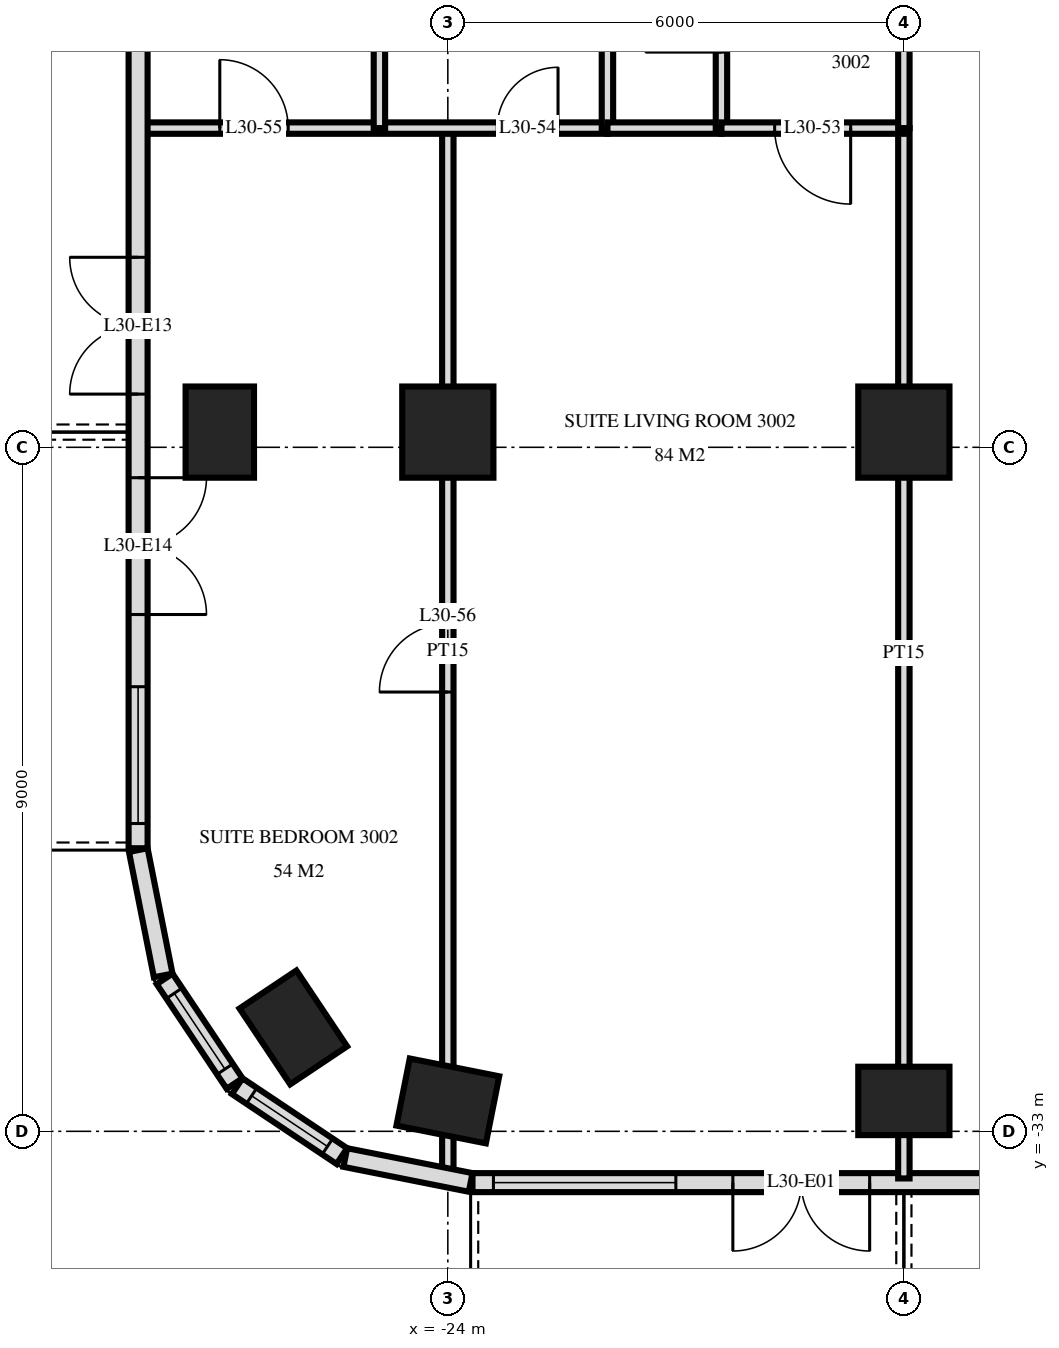
"""IFC4 building model, lengths in metres.
Left out: names, types, materials, properties, quantities, classifications, styles, units other than length and angle.
Written with IfcOpenShell. Run it as: python <this file> out.ifc"""

import sys

from ifc_helpers import new_model, si_unit, direction, frame, frame_2d, origin, origin_2d, place, context, subcontext, project, spatial, rectangle, extrude, element, fill, save


model = new_model("IFC4")
c1 = context("Model", 3, precision=1e-05, world=origin(), true_north=direction((0.0, 1.0)))
c2 = subcontext(c1, "Body", "Model", "MODEL_VIEW")
j1 = project(units=[si_unit("LENGTHUNIT", "METRE"), si_unit("PLANEANGLEUNIT", "RADIAN")], contexts=[c1])
p1 = place(None, origin())
s1 = spatial("IfcSite", under=j1, at=p1, CompositionType="ELEMENT")
p2 = place(p1, origin())
s2 = spatial("IfcBuilding", under=s1, at=p2, CompositionType="ELEMENT")
p3 = place(p2, frame((0.0, 0.0, 120.0)))
s3 = spatial("IfcBuildingStorey", under=s2, at=p3, CompositionType="ELEMENT", Elevation=120.0)
for number, where, z_axis, x_axis in (
    (1, (-27.0, -23.8, 0.0), (0.0, 0.0, 1.0), (0.0, 1.0, 0.0)),
    (2, (-26.033, -31.633, 0.0), (0.0, 0.0, 1.0), (-0.556, 0.831, 0.0)),
    (3, (-24.0, -32.6, 0.0), (0.0, 0.0, 1.0), (-0.981, 0.195, 0.0)),
):
    element("IfcColumn", number, at=place(p3, frame(where, z_axis=z_axis, x_axis=x_axis)), inside=s3, PredefinedType="COLUMN", context=c2, shape_type="SweptSolid", body=[
        extrude(rectangle(XDim=1.2, YDim=0.9, at=origin_2d()), origin(), (0.0, 0.0, 1.0), 3.6),
    ])
p4 = place(p3, frame((-24.0, -23.8, 0.0), z_axis=(0.0, 0.0, 1.0), x_axis=(1.0, 0.0, 0.0)))
e4 = element("IfcColumn", 4, at=p4, inside=s3, PredefinedType="COLUMN", context=c2, shape_type="SweptSolid", body=[
    extrude(rectangle(XDim=1.2, YDim=1.2, at=origin_2d()), origin(), (0.0, 0.0, 1.0), 3.6),
])
p5 = place(p3, frame((-18.0, -32.6, 0.0), z_axis=(0.0, 0.0, 1.0), x_axis=(1.0, 0.0, 0.0)))
e5 = element("IfcColumn", 5, at=p5, inside=s3, PredefinedType="COLUMN", context=c2, shape_type="SweptSolid", body=[
    extrude(rectangle(XDim=1.2, YDim=0.9, at=origin_2d()), origin(), (0.0, 0.0, 1.0), 3.6),
])
p6 = place(p3, frame((-18.0, -23.8, 0.0), z_axis=(0.0, 0.0, 1.0), x_axis=(1.0, 0.0, 0.0)))
e6 = element("IfcColumn", 6, at=p6, inside=s3, PredefinedType="COLUMN", context=c2, shape_type="SweptSolid", body=[
    extrude(rectangle(XDim=1.2, YDim=1.2, at=origin_2d()), origin(), (0.0, 0.0, 1.0), 3.6),
])
p7 = place(p3, frame((-28.075, -3.325, 0.0), z_axis=(0.0, 0.0, 1.0), x_axis=(0.0, -1.0, 0.0)))
e7 = element("IfcWall", 7, at=p7, inside=s3, PredefinedType="SOLIDWALL", context=c2, shape_type="SweptSolid", body=[
    extrude(rectangle(XDim=25.951, YDim=0.25, at=frame_2d((12.975, 0.0))), origin(), (0.0, 0.0, 1.0), 3.32),
])
p8 = place(p7, frame((7.025, 0.0, 0.0)))
e8 = element("IfcOpeningElement", 8, at=p8, cuts=e7, PredefinedType="OPENING", context=c2, shape_type="SweptSolid", body=[
    extrude(rectangle(XDim=1.8, YDim=2.4, at=frame_2d((0.9, 1.2))), frame((0.0, 0.135, 0.0), z_axis=(0.0, -1.0, 0.0), x_axis=(1.0, 0.0, 0.0)), (0.0, 0.0, 1.0), 0.27),
])
p9 = place(p7, frame((18.175, 0.0, 0.0)))
e9 = element("IfcOpeningElement", 9, at=p9, cuts=e7, PredefinedType="OPENING", context=c2, shape_type="SweptSolid", body=[
    extrude(rectangle(XDim=1.8, YDim=2.4, at=frame_2d((0.9, 1.2))), frame((0.0, 0.135, 0.0), z_axis=(0.0, -1.0, 0.0), x_axis=(1.0, 0.0, 0.0)), (0.0, 0.0, 1.0), 0.27),
])
p10 = place(p7, frame((21.075, 0.0, 0.0)))
e10 = element("IfcOpeningElement", 10, at=p10, cuts=e7, PredefinedType="OPENING", context=c2, shape_type="SweptSolid", body=[
    extrude(rectangle(XDim=1.8, YDim=2.4, at=frame_2d((0.9, 1.2))), frame((0.0, 0.135, 0.0), z_axis=(0.0, -1.0, 0.0), x_axis=(1.0, 0.0, 0.0)), (0.0, 0.0, 1.0), 0.27),
])
p11 = place(p7, frame((23.825, 0.0, 0.3)))
e11 = element("IfcOpeningElement", 11, at=p11, cuts=e7, PredefinedType="OPENING", context=c2, shape_type="SweptSolid", body=[
    extrude(rectangle(XDim=1.8, YDim=2.1, at=frame_2d((0.9, 1.05))), frame((0.0, 0.135, 0.0), z_axis=(0.0, -1.0, 0.0), x_axis=(1.0, 0.0, 0.0)), (0.0, 0.0, 1.0), 0.27),
])
p12 = place(p3, frame((-28.073, -29.3, 0.0), z_axis=(0.0, 0.0, 1.0), x_axis=(0.194999110559, -0.980803419081, 0.0)))
e12 = element("IfcWall", 12, at=p12, inside=s3, PredefinedType="SOLIDWALL", context=c2, shape_type="SweptSolid", body=[
    extrude(rectangle(XDim=1.681, YDim=0.25, at=frame_2d((0.841, 0.0))), origin(), (0.0, 0.0, 1.0), 3.32),
])
p13 = place(p3, frame((-27.726, -30.994, 0.0), z_axis=(0.0, 0.0, 1.0), x_axis=(0.55555029066, -0.831482937015, 0.0)))
e13 = element("IfcWall", 13, at=p13, inside=s3, PredefinedType="SOLIDWALL", context=c2, shape_type="SweptSolid", body=[
    extrude(rectangle(XDim=1.656, YDim=0.25, at=frame_2d((0.828, 0.0))), origin(), (0.0, 0.0, 1.0), 3.32),
])
p14 = place(p13, frame((0.228, 0.0, 0.9)))
e14 = element("IfcOpeningElement", 14, at=p14, cuts=e13, PredefinedType="OPENING", context=c2, shape_type="SweptSolid", body=[
    extrude(rectangle(XDim=1.2, YDim=1.5, at=frame_2d((0.6, 0.75))), frame((0.0, 0.135, 0.0), z_axis=(0.0, -1.0, 0.0), x_axis=(1.0, 0.0, 0.0)), (0.0, 0.0, 1.0), 0.27),
])
p15 = place(p3, frame((-26.771, -32.406, 0.0), z_axis=(0.0, 0.0, 1.0), x_axis=(0.831482937015, -0.55555029066, 0.0)))
e15 = element("IfcWall", 15, at=p15, inside=s3, PredefinedType="SOLIDWALL", context=c2, shape_type="SweptSolid", body=[
    extrude(rectangle(XDim=1.656, YDim=0.25, at=frame_2d((0.828, 0.0))), origin(), (0.0, 0.0, 1.0), 3.32),
])
p16 = place(p15, frame((0.228, 0.0, 0.9)))
e16 = element("IfcOpeningElement", 16, at=p16, cuts=e15, PredefinedType="OPENING", context=c2, shape_type="SweptSolid", body=[
    extrude(rectangle(XDim=1.2, YDim=1.5, at=frame_2d((0.6, 0.75))), frame((0.0, 0.135, 0.0), z_axis=(0.0, -1.0, 0.0), x_axis=(1.0, 0.0, 0.0)), (0.0, 0.0, 1.0), 0.27),
])
p17 = place(p3, frame((-25.349, -33.344, 0.0), z_axis=(0.0, 0.0, 1.0), x_axis=(0.980775640221, -0.19513878023, 0.0)))
e17 = element("IfcWall", 17, at=p17, inside=s3, PredefinedType="SOLIDWALL", context=c2, shape_type="SweptSolid", body=[
    extrude(rectangle(XDim=1.681, YDim=0.25, at=frame_2d((0.841, 0.0))), origin(), (0.0, 0.0, 1.0), 3.32),
])
p18 = place(p3, frame((-23.675, -33.675, 0.0), z_axis=(0.0, 0.0, 1.0), x_axis=(1.0, 0.0, 0.0)))
e18 = element("IfcWall", 18, at=p18, inside=s3, PredefinedType="SOLIDWALL", context=c2, shape_type="SweptSolid", body=[
    extrude(rectangle(XDim=47.351, YDim=0.25, at=frame_2d((23.675, 0.0))), origin(), (0.0, 0.0, 1.0), 3.32),
])
p19 = place(p18, frame((0.275, 0.0, 0.3)))
e19 = element("IfcOpeningElement", 19, at=p19, cuts=e18, PredefinedType="OPENING", context=c2, shape_type="SweptSolid", body=[
    extrude(rectangle(XDim=2.4, YDim=2.1, at=frame_2d((1.2, 1.05))), frame((0.0, 0.135, 0.0), z_axis=(0.0, -1.0, 0.0), x_axis=(1.0, 0.0, 0.0)), (0.0, 0.0, 1.0), 0.27),
])
p20 = place(p18, frame((3.425, 0.0, 0.0)))
e20 = element("IfcOpeningElement", 20, at=p20, cuts=e18, PredefinedType="OPENING", context=c2, shape_type="SweptSolid", body=[
    extrude(rectangle(XDim=1.8, YDim=2.4, at=frame_2d((0.9, 1.2))), frame((0.0, 0.135, 0.0), z_axis=(0.0, -1.0, 0.0), x_axis=(1.0, 0.0, 0.0)), (0.0, 0.0, 1.0), 0.27),
])
p21 = place(p18, frame((7.775, 0.0, 0.0)))
e21 = element("IfcOpeningElement", 21, at=p21, cuts=e18, PredefinedType="OPENING", context=c2, shape_type="SweptSolid", body=[
    extrude(rectangle(XDim=1.8, YDim=2.4, at=frame_2d((0.9, 1.2))), frame((0.0, 0.135, 0.0), z_axis=(0.0, -1.0, 0.0), x_axis=(1.0, 0.0, 0.0)), (0.0, 0.0, 1.0), 0.27),
])
p22 = place(p18, frame((12.275, 0.0, 0.0)))
e22 = element("IfcOpeningElement", 22, at=p22, cuts=e18, PredefinedType="OPENING", context=c2, shape_type="SweptSolid", body=[
    extrude(rectangle(XDim=1.8, YDim=2.4, at=frame_2d((0.9, 1.2))), frame((0.0, 0.135, 0.0), z_axis=(0.0, -1.0, 0.0), x_axis=(1.0, 0.0, 0.0)), (0.0, 0.0, 1.0), 0.27),
])
p23 = place(p18, frame((14.975, 0.0, 0.3)))
e23 = element("IfcOpeningElement", 23, at=p23, cuts=e18, PredefinedType="OPENING", context=c2, shape_type="SweptSolid", body=[
    extrude(rectangle(XDim=2.4, YDim=2.1, at=frame_2d((1.2, 1.05))), frame((0.0, 0.135, 0.0), z_axis=(0.0, -1.0, 0.0), x_axis=(1.0, 0.0, 0.0)), (0.0, 0.0, 1.0), 0.27),
])
p24 = place(p18, frame((17.975, 0.0, 0.3)))
e24 = element("IfcOpeningElement", 24, at=p24, cuts=e18, PredefinedType="OPENING", context=c2, shape_type="SweptSolid", body=[
    extrude(rectangle(XDim=2.4, YDim=2.1, at=frame_2d((1.2, 1.05))), frame((0.0, 0.135, 0.0), z_axis=(0.0, -1.0, 0.0), x_axis=(1.0, 0.0, 0.0)), (0.0, 0.0, 1.0), 0.27),
])
p25 = place(p18, frame((21.275, 0.0, 0.0)))
e25 = element("IfcOpeningElement", 25, at=p25, cuts=e18, PredefinedType="OPENING", context=c2, shape_type="SweptSolid", body=[
    extrude(rectangle(XDim=1.8, YDim=2.4, at=frame_2d((0.9, 1.2))), frame((0.0, 0.135, 0.0), z_axis=(0.0, -1.0, 0.0), x_axis=(1.0, 0.0, 0.0)), (0.0, 0.0, 1.0), 0.27),
])
p26 = place(p18, frame((24.275, 0.0, 0.0)))
e26 = element("IfcOpeningElement", 26, at=p26, cuts=e18, PredefinedType="OPENING", context=c2, shape_type="SweptSolid", body=[
    extrude(rectangle(XDim=1.8, YDim=2.4, at=frame_2d((0.9, 1.2))), frame((0.0, 0.135, 0.0), z_axis=(0.0, -1.0, 0.0), x_axis=(1.0, 0.0, 0.0)), (0.0, 0.0, 1.0), 0.27),
])
p27 = place(p18, frame((26.975, 0.0, 0.3)))
e27 = element("IfcOpeningElement", 27, at=p27, cuts=e18, PredefinedType="OPENING", context=c2, shape_type="SweptSolid", body=[
    extrude(rectangle(XDim=2.4, YDim=2.1, at=frame_2d((1.2, 1.05))), frame((0.0, 0.135, 0.0), z_axis=(0.0, -1.0, 0.0), x_axis=(1.0, 0.0, 0.0)), (0.0, 0.0, 1.0), 0.27),
])
p28 = place(p18, frame((30.275, 0.0, 0.0)))
e28 = element("IfcOpeningElement", 28, at=p28, cuts=e18, PredefinedType="OPENING", context=c2, shape_type="SweptSolid", body=[
    extrude(rectangle(XDim=1.8, YDim=2.4, at=frame_2d((0.9, 1.2))), frame((0.0, 0.135, 0.0), z_axis=(0.0, -1.0, 0.0), x_axis=(1.0, 0.0, 0.0)), (0.0, 0.0, 1.0), 0.27),
])
p29 = place(p18, frame((32.975, 0.0, 0.3)))
e29 = element("IfcOpeningElement", 29, at=p29, cuts=e18, PredefinedType="OPENING", context=c2, shape_type="SweptSolid", body=[
    extrude(rectangle(XDim=2.4, YDim=2.1, at=frame_2d((1.2, 1.05))), frame((0.0, 0.135, 0.0), z_axis=(0.0, -1.0, 0.0), x_axis=(1.0, 0.0, 0.0)), (0.0, 0.0, 1.0), 0.27),
])
p30 = place(p18, frame((35.975, 0.0, 0.3)))
e30 = element("IfcOpeningElement", 30, at=p30, cuts=e18, PredefinedType="OPENING", context=c2, shape_type="SweptSolid", body=[
    extrude(rectangle(XDim=2.4, YDim=2.1, at=frame_2d((1.2, 1.05))), frame((0.0, 0.135, 0.0), z_axis=(0.0, -1.0, 0.0), x_axis=(1.0, 0.0, 0.0)), (0.0, 0.0, 1.0), 0.27),
])
p31 = place(p18, frame((39.275, 0.0, 0.0)))
e31 = element("IfcOpeningElement", 31, at=p31, cuts=e18, PredefinedType="OPENING", context=c2, shape_type="SweptSolid", body=[
    extrude(rectangle(XDim=1.8, YDim=2.4, at=frame_2d((0.9, 1.2))), frame((0.0, 0.135, 0.0), z_axis=(0.0, -1.0, 0.0), x_axis=(1.0, 0.0, 0.0)), (0.0, 0.0, 1.0), 0.27),
])
p32 = place(p18, frame((41.975, 0.0, 0.3)))
e32 = element("IfcOpeningElement", 32, at=p32, cuts=e18, PredefinedType="OPENING", context=c2, shape_type="SweptSolid", body=[
    extrude(rectangle(XDim=2.4, YDim=2.1, at=frame_2d((1.2, 1.05))), frame((0.0, 0.135, 0.0), z_axis=(0.0, -1.0, 0.0), x_axis=(1.0, 0.0, 0.0)), (0.0, 0.0, 1.0), 0.27),
])
p33 = place(p18, frame((45.125, 0.0, 0.0)))
e33 = element("IfcOpeningElement", 33, at=p33, cuts=e18, PredefinedType="OPENING", context=c2, shape_type="SweptSolid", body=[
    extrude(rectangle(XDim=1.8, YDim=2.4, at=frame_2d((0.9, 1.2))), frame((0.0, 0.135, 0.0), z_axis=(0.0, -1.0, 0.0), x_axis=(1.0, 0.0, 0.0)), (0.0, 0.0, 1.0), 0.27),
])
p34 = place(p3, frame((-18.0, -19.8, 0.0), z_axis=(0.0, 0.0, 1.0), x_axis=(0.0, 1.0, 0.0)))
e34 = element("IfcWall", 34, at=p34, inside=s3, PredefinedType="PARTITIONING", context=c2, shape_type="SweptSolid", body=[
    extrude(rectangle(XDim=3.0, YDim=0.15, at=frame_2d((1.5, 0.0))), origin(), (0.0, 0.0, 1.0), 3.32),
])
p35 = place(p3, frame((-18.0, -33.62, 0.0), z_axis=(0.0, 0.0, 1.0), x_axis=(0.0, 1.0, 0.0)))
e35 = element("IfcWall", 35, at=p35, inside=s3, PredefinedType="PARTITIONING", context=c2, shape_type="SweptSolid", body=[
    extrude(rectangle(XDim=13.82, YDim=0.15, at=frame_2d((6.91, 0.0))), origin(), (0.0, 0.0, 1.0), 3.32),
])
p36 = place(p3, frame((-20.4, -19.8, 0.0), z_axis=(0.0, 0.0, 1.0), x_axis=(0.0, 1.0, 0.0)))
e36 = element("IfcWall", 36, at=p36, inside=s3, PredefinedType="PARTITIONING", context=c2, shape_type="SweptSolid", body=[
    extrude(rectangle(XDim=3.0, YDim=0.15, at=frame_2d((1.5, 0.0))), origin(), (0.0, 0.0, 1.0), 3.32),
])
p37 = place(p36, frame((1.0, 0.0, 0.0)))
e37 = element("IfcOpeningElement", 37, at=p37, cuts=e36, PredefinedType="OPENING", context=c2, shape_type="SweptSolid", body=[
    extrude(rectangle(XDim=1.0, YDim=2.1, at=frame_2d((0.5, 1.05))), frame((0.0, 0.085, 0.0), z_axis=(0.0, -1.0, 0.0), x_axis=(1.0, 0.0, 0.0)), (0.0, 0.0, 1.0), 0.17),
])
p38 = place(p3, frame((-21.9, -19.8, 0.0), z_axis=(0.0, 0.0, 1.0), x_axis=(0.0, 1.0, 0.0)))
e38 = element("IfcWall", 38, at=p38, inside=s3, PredefinedType="PLUMBINGWALL", context=c2, shape_type="SweptSolid", body=[
    extrude(rectangle(XDim=3.0, YDim=0.15, at=frame_2d((1.5, 0.0))), origin(), (0.0, 0.0, 1.0), 3.32),
])
p39 = place(p3, frame((-24.0, -33.557, 0.0), z_axis=(0.0, 0.0, 1.0), x_axis=(0.0, 1.0, 0.0)))
e39 = element("IfcWall", 39, at=p39, inside=s3, PredefinedType="PARTITIONING", context=c2, shape_type="SweptSolid", body=[
    extrude(rectangle(XDim=13.757, YDim=0.15, at=frame_2d((6.878, 0.0))), origin(), (0.0, 0.0, 1.0), 3.32),
])
p40 = place(p39, frame((6.337, 0.0, 0.0)))
e40 = element("IfcOpeningElement", 40, at=p40, cuts=e39, PredefinedType="OPENING", context=c2, shape_type="SweptSolid", body=[
    extrude(rectangle(XDim=0.9, YDim=2.1, at=frame_2d((0.45, 1.05))), frame((0.0, 0.085, 0.0), z_axis=(0.0, -1.0, 0.0), x_axis=(1.0, 0.0, 0.0)), (0.0, 0.0, 1.0), 0.17),
])
p41 = place(p3, frame((-24.9, -19.8, 0.0), z_axis=(0.0, 0.0, 1.0), x_axis=(0.0, 1.0, 0.0)))
e41 = element("IfcWall", 41, at=p41, inside=s3, PredefinedType="PARTITIONING", context=c2, shape_type="SweptSolid", body=[
    extrude(rectangle(XDim=3.0, YDim=0.15, at=frame_2d((1.5, 0.0))), origin(), (0.0, 0.0, 1.0), 3.32),
])
p42 = place(p3, frame((-20.4, -19.8, 0.0), z_axis=(0.0, 0.0, 1.0), x_axis=(1.0, 0.0, 0.0)))
e42 = element("IfcWall", 42, at=p42, inside=s3, PredefinedType="PARTITIONING", context=c2, shape_type="SweptSolid", body=[
    extrude(rectangle(XDim=2.4, YDim=0.15, at=frame_2d((1.2, 0.0))), origin(), (0.0, 0.0, 1.0), 3.32),
])
p43 = place(p42, frame((0.7, 0.0, 0.0)))
e43 = element("IfcOpeningElement", 43, at=p43, cuts=e42, PredefinedType="OPENING", context=c2, shape_type="SweptSolid", body=[
    extrude(rectangle(XDim=1.0, YDim=2.1, at=frame_2d((0.5, 1.05))), frame((0.0, 0.085, 0.0), z_axis=(0.0, -1.0, 0.0), x_axis=(1.0, 0.0, 0.0)), (0.0, 0.0, 1.0), 0.17),
])
p44 = place(p3, frame((-28.02, -19.8, 0.0), z_axis=(0.0, 0.0, 1.0), x_axis=(1.0, 0.0, 0.0)))
e44 = element("IfcWall", 44, at=p44, inside=s3, PredefinedType="PARTITIONING", context=c2, shape_type="SweptSolid", body=[
    extrude(rectangle(XDim=6.12, YDim=0.15, at=frame_2d((3.06, 0.0))), origin(), (0.0, 0.0, 1.0), 3.32),
])
p45 = place(p44, frame((4.67, 0.0, 0.0)))
e45 = element("IfcOpeningElement", 45, at=p45, cuts=e44, PredefinedType="OPENING", context=c2, shape_type="SweptSolid", body=[
    extrude(rectangle(XDim=0.8, YDim=2.1, at=frame_2d((0.4, 1.05))), frame((0.0, 0.085, 0.0), z_axis=(0.0, -1.0, 0.0), x_axis=(1.0, 0.0, 0.0)), (0.0, 0.0, 1.0), 0.17),
])
p46 = place(p44, frame((1.02, 0.0, 0.0)))
e46 = element("IfcOpeningElement", 46, at=p46, cuts=e44, PredefinedType="OPENING", context=c2, shape_type="SweptSolid", body=[
    extrude(rectangle(XDim=0.9, YDim=2.1, at=frame_2d((0.45, 1.05))), frame((0.0, 0.085, 0.0), z_axis=(0.0, -1.0, 0.0), x_axis=(1.0, 0.0, 0.0)), (0.0, 0.0, 1.0), 0.17),
])
p47 = place(p3, frame((-21.9, -19.8, 0.0), z_axis=(0.0, 0.0, 1.0), x_axis=(1.0, 0.0, 0.0)))
e47 = element("IfcWall", 47, at=p47, inside=s3, PredefinedType="PLUMBINGWALL", context=c2, shape_type="SweptSolid", body=[
    extrude(rectangle(XDim=1.5, YDim=0.15, at=frame_2d((0.75, 0.0))), origin(), (0.0, 0.0, 1.0), 3.32),
])
p48 = place(p14, origin())
e48 = element("IfcWindow", 48, at=p48, inside=s3, PartitioningType="SINGLE_PANEL", PredefinedType="WINDOW", context=c2, shape_type="SweptSolid", body=[
    extrude(rectangle(XDim=1.2, YDim=1.5, at=frame_2d((0.6, 0.75))), frame((0.0, 0.03, 0.0), z_axis=(0.0, -1.0, 0.0), x_axis=(1.0, 0.0, 0.0)), (0.0, 0.0, 1.0), 0.06),
])
fill(e14, e48)
p49 = place(p16, origin())
e49 = element("IfcWindow", 49, at=p49, inside=s3, PartitioningType="SINGLE_PANEL", PredefinedType="WINDOW", context=c2, shape_type="SweptSolid", body=[
    extrude(rectangle(XDim=1.2, YDim=1.5, at=frame_2d((0.6, 0.75))), frame((0.0, 0.03, 0.0), z_axis=(0.0, -1.0, 0.0), x_axis=(1.0, 0.0, 0.0)), (0.0, 0.0, 1.0), 0.06),
])
fill(e16, e49)
p50 = place(p19, origin())
e50 = element("IfcWindow", 50, at=p50, inside=s3, PartitioningType="SINGLE_PANEL", PredefinedType="WINDOW", context=c2, shape_type="SweptSolid", body=[
    extrude(rectangle(XDim=2.4, YDim=2.1, at=frame_2d((1.2, 1.05))), frame((0.0, 0.03, 0.0), z_axis=(0.0, -1.0, 0.0), x_axis=(1.0, 0.0, 0.0)), (0.0, 0.0, 1.0), 0.06),
])
fill(e19, e50)
p51 = place(p20, frame((0.9, 0.0, 0.0), z_axis=(0.0, 0.0, 1.0), x_axis=(-1.0, 0.0, 0.0)))
e51 = element("IfcDoor", 51, at=p51, inside=s3, OperationType="DOUBLE_DOOR_SINGLE_SWING", PredefinedType="DOOR", context=c2, shape_type="SweptSolid", body=[
    extrude(rectangle(XDim=1.8, YDim=2.4, at=frame_2d((0.0, 1.2))), frame((0.0, -0.025, 0.0), z_axis=(0.0, 1.0, 0.0), x_axis=(-1.0, 0.0, 0.0)), (0.0, 0.0, 1.0), 0.05),
])
fill(e20, e51)
p52 = place(p9, frame((0.9, 0.0, 0.0), z_axis=(0.0, 0.0, 1.0), x_axis=(-1.0, 0.0, 0.0)))
e52 = element("IfcDoor", 52, at=p52, inside=s3, OperationType="DOUBLE_DOOR_SINGLE_SWING", PredefinedType="DOOR", context=c2, shape_type="SweptSolid", body=[
    extrude(rectangle(XDim=1.8, YDim=2.4, at=frame_2d((0.0, 1.2))), frame((0.0, -0.025, 0.0), z_axis=(0.0, 1.0, 0.0), x_axis=(-1.0, 0.0, 0.0)), (0.0, 0.0, 1.0), 0.05),
])
fill(e9, e52)
p53 = place(p10, origin())
e53 = element("IfcDoor", 53, at=p53, inside=s3, OperationType="DOUBLE_DOOR_SINGLE_SWING", PredefinedType="DOOR", context=c2, shape_type="SweptSolid", body=[
    extrude(rectangle(XDim=1.8, YDim=2.4, at=frame_2d((0.9, 1.2))), frame((0.0, 0.025, 0.0), z_axis=(0.0, -1.0, 0.0), x_axis=(1.0, 0.0, 0.0)), (0.0, 0.0, 1.0), 0.05),
])
fill(e10, e53)
p54 = place(p11, origin())
e54 = element("IfcWindow", 54, at=p54, inside=s3, PartitioningType="SINGLE_PANEL", PredefinedType="WINDOW", context=c2, shape_type="SweptSolid", body=[
    extrude(rectangle(XDim=1.8, YDim=2.1, at=frame_2d((0.9, 1.05))), frame((0.0, 0.03, 0.0), z_axis=(0.0, -1.0, 0.0), x_axis=(1.0, 0.0, 0.0)), (0.0, 0.0, 1.0), 0.06),
])
fill(e11, e54)
p55 = place(p43, frame((0.5, 0.0, 0.0), z_axis=(0.0, 0.0, 1.0), x_axis=(-1.0, 0.0, 0.0)))
e55 = element("IfcDoor", 55, at=p55, inside=s3, OperationType="SINGLE_SWING_RIGHT", PredefinedType="DOOR", context=c2, shape_type="SweptSolid", body=[
    extrude(rectangle(XDim=1.0, YDim=2.1, at=frame_2d((0.0, 1.05))), frame((0.0, -0.025, 0.0), z_axis=(0.0, 1.0, 0.0), x_axis=(-1.0, 0.0, 0.0)), (0.0, 0.0, 1.0), 0.05),
])
fill(e43, e55)
p56 = place(p45, origin())
e56 = element("IfcDoor", 56, at=p56, inside=s3, OperationType="SINGLE_SWING_LEFT", PredefinedType="DOOR", context=c2, shape_type="SweptSolid", body=[
    extrude(rectangle(XDim=0.8, YDim=2.1, at=frame_2d((0.4, 1.05))), frame((0.0, 0.025, 0.0), z_axis=(0.0, -1.0, 0.0), x_axis=(1.0, 0.0, 0.0)), (0.0, 0.0, 1.0), 0.05),
])
fill(e45, e56)
p57 = place(p46, origin())
e57 = element("IfcDoor", 57, at=p57, inside=s3, OperationType="SINGLE_SWING_RIGHT", PredefinedType="DOOR", context=c2, shape_type="SweptSolid", body=[
    extrude(rectangle(XDim=0.9, YDim=2.1, at=frame_2d((0.45, 1.05))), frame((0.0, 0.025, 0.0), z_axis=(0.0, -1.0, 0.0), x_axis=(1.0, 0.0, 0.0)), (0.0, 0.0, 1.0), 0.05),
])
fill(e46, e57)
p58 = place(p40, origin())
e58 = element("IfcDoor", 58, at=p58, inside=s3, OperationType="SINGLE_SWING_RIGHT", PredefinedType="DOOR", context=c2, shape_type="SweptSolid", body=[
    extrude(rectangle(XDim=0.9, YDim=2.1, at=frame_2d((0.45, 1.05))), frame((0.0, 0.025, 0.0), z_axis=(0.0, -1.0, 0.0), x_axis=(1.0, 0.0, 0.0)), (0.0, 0.0, 1.0), 0.05),
])
fill(e40, e58)
save(model, sys.argv[1])
